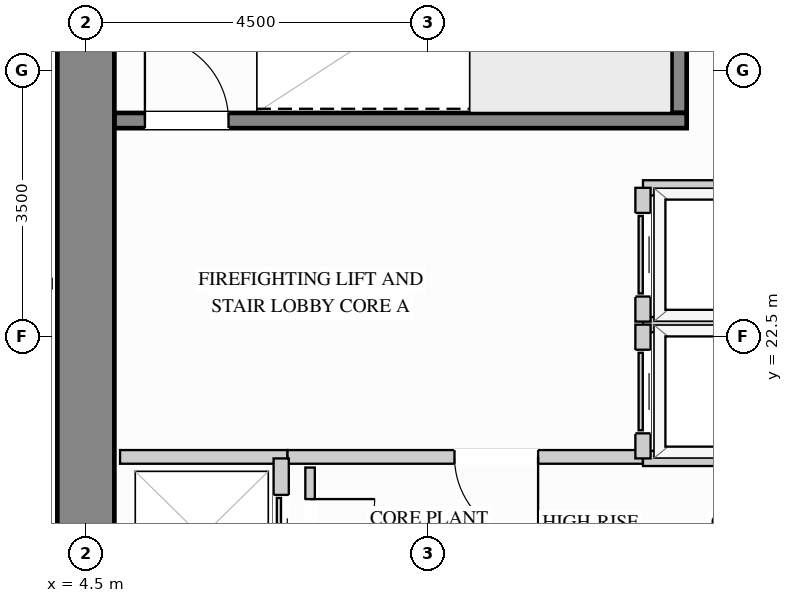
"""IFC4 building model, lengths in metres.
Left out: names, types, materials, properties, quantities, classifications, styles, units other than length and angle.
Written with IfcOpenShell. Run it as: python <this file> out.ifc"""

import sys

from ifc_helpers import new_model, si_unit, direction, frame, frame_2d, origin, place, context, subcontext, project, spatial, rectangle, extrude, source, transform, mapped, element, fill, save


model = new_model("IFC4")
c1 = context("Model", 3, precision=1e-05, world=origin(), true_north=direction((0.0, 1.0)))
c2 = subcontext(c1, "Body", "Model", "MODEL_VIEW")
j1 = project(units=[si_unit("LENGTHUNIT", "METRE"), si_unit("PLANEANGLEUNIT", "RADIAN")], contexts=[c1])
p1 = place(None, origin())
s1 = spatial("IfcSite", under=j1, at=p1, CompositionType="ELEMENT")
p2 = place(p1, origin())
s2 = spatial("IfcBuilding", under=s1, at=p2, CompositionType="ELEMENT")
p3 = place(p2, frame((0.0, 0.0, 99.0)))
s3 = spatial("IfcBuildingStorey", under=s2, at=p3, CompositionType="ELEMENT", Elevation=99.0)
m1 = source(origin(), c2, "Body", "SweptSolid", [
    extrude(rectangle(XDim=20.25, YDim=0.75, at=frame_2d((10.125, 0.0))), origin(), (0.0, 0.0, 1.0), 3.38),
])
p4 = place(p3, frame((4.5, 8.875, 0.0), z_axis=(0.0, 0.0, 1.0), x_axis=(0.0, 1.0, 0.0)))
e1 = element("IfcWall", 1, at=p4, inside=s3, PredefinedType="SHEAR", context=c2, shape_type="MappedRepresentation", body=[
    mapped(m1, transform((0.0, 0.0, 0.0), x_axis=(1.0, 0.0, 0.0), y_axis=(0.0, 1.0, 0.0), z_axis=(0.0, 0.0, 1.0))),
])
p5 = place(p3, frame((7.15, 20.92, 0.0), z_axis=(0.0, 0.0, 1.0), x_axis=(1.0, 0.0, 0.0)))
e2 = element("IfcWall", 2, at=p5, inside=s3, PredefinedType="PARTITIONING", context=c2, shape_type="SweptSolid", body=[
    extrude(rectangle(XDim=4.68, YDim=0.18, at=frame_2d((2.34, 0.0))), origin(), (0.0, 0.0, 1.0), 3.365),
])
p6 = place(p5, frame((2.2, 0.0, 0.0)))
e3 = element("IfcOpeningElement", 3, at=p6, cuts=e2, PredefinedType="OPENING", context=c2, shape_type="SweptSolid", body=[
    extrude(rectangle(XDim=1.1, YDim=2.15, at=frame_2d((0.55, 1.075))), frame((0.0, 0.1, 0.0), z_axis=(0.0, -1.0, 0.0), x_axis=(1.0, 0.0, 0.0)), (0.0, 0.0, 1.0), 0.2),
])
m2 = source(origin(), c2, "Body", "SweptSolid", [
    extrude(rectangle(XDim=2.2, YDim=0.18, at=frame_2d((1.1, 0.0))), origin(), (0.0, 0.0, 1.0), 3.365),
])
p7 = place(p3, frame((4.95, 20.92, 0.0), z_axis=(0.0, 0.0, 1.0), x_axis=(1.0, 0.0, 0.0)))
e4 = element("IfcWall", 4, at=p7, inside=s3, PredefinedType="PARTITIONING", context=c2, shape_type="MappedRepresentation", body=[
    mapped(m2, transform((0.0, 0.0, 0.0), x_axis=(1.0, 0.0, 0.0), y_axis=(0.0, 1.0, 0.0), z_axis=(0.0, 0.0, 1.0))),
])
p8 = place(p3, frame((7.45, 19.2, 0.0), z_axis=(0.0, 0.0, 1.0), x_axis=(0.0, 1.0, 0.0)))
e5 = element("IfcWall", 5, at=p8, inside=s3, PredefinedType="PARTITIONING", context=c2, shape_type="SweptSolid", body=[
    extrude(rectangle(XDim=1.58, YDim=0.125, at=frame_2d((0.79, 0.0))), origin(), (0.0, 0.0, 1.0), 3.365),
])
p9 = place(p8, frame((0.315, 0.0, 0.0)))
e6 = element("IfcOpeningElement", 6, at=p9, cuts=e5, PredefinedType="OPENING", context=c2, shape_type="SweptSolid", body=[
    extrude(rectangle(XDim=0.85, YDim=2.1, at=frame_2d((0.425, 1.05))), frame((0.0, 0.073, 0.0), z_axis=(0.0, -1.0, 0.0), x_axis=(1.0, 0.0, 0.0)), (0.0, 0.0, 1.0), 0.145),
])
m3 = source(origin(), c2, "Body", "SweptSolid", [
    extrude(rectangle(XDim=3.698, YDim=0.125, at=frame_2d((1.849, 0.0))), origin(), (0.0, 0.0, 1.0), 3.365),
])
p10 = place(p3, frame((0.352, 23.2, 0.0), z_axis=(0.0, 0.0, 1.0), x_axis=(1.0, 0.0, 0.0)))
e7 = element("IfcWall", 7, at=p10, inside=s3, PredefinedType="PARTITIONING", context=c2, shape_type="MappedRepresentation", body=[
    mapped(m3, transform((0.0, 0.0, 0.0), x_axis=(1.0, 0.0, 0.0), y_axis=(0.0, 1.0, 0.0), z_axis=(0.0, 0.0, 1.0))),
])
m4 = source(origin(), c2, "Body", "SweptSolid", [
    extrude(rectangle(XDim=2.265, YDim=0.2, at=frame_2d((1.132, 0.0))), origin(), (0.0, 0.0, 1.0), 3.365),
])
for number, where, z_axis, x_axis in (
    (8, (11.83, 22.66, 0.0), (0.0, 0.0, 1.0), (1.0, 0.0, 0.0)),
    (9, (11.83, 20.9, 0.0), (0.0, 0.0, 1.0), (1.0, 0.0, 0.0)),
):
    element("IfcWall", number, at=place(p3, frame(where, z_axis=z_axis, x_axis=x_axis)), inside=s3, PredefinedType="PARTITIONING", context=c2, shape_type="MappedRepresentation", body=[
        mapped(m4, transform((0.0, 0.0, 0.0), x_axis=(1.0, 0.0, 0.0), y_axis=(0.0, 1.0, 0.0), z_axis=(0.0, 0.0, 1.0))),
    ])
p11 = place(p3, frame((11.83, 20.9, 0.0), z_axis=(0.0, 0.0, 1.0), x_axis=(0.0, 1.0, 0.0)))
e10 = element("IfcWall", 10, at=p11, inside=s3, PredefinedType="PARTITIONING", context=c2, shape_type="SweptSolid", body=[
    extrude(rectangle(XDim=1.76, YDim=0.2, at=frame_2d((0.88, 0.0))), origin(), (0.0, 0.0, 1.0), 3.365),
])
p12 = place(p11, frame((0.33, 0.0, 0.0)))
e11 = element("IfcOpeningElement", 11, at=p12, cuts=e10, PredefinedType="OPENING", context=c2, shape_type="SweptSolid", body=[
    extrude(rectangle(XDim=1.1, YDim=2.2, at=frame_2d((0.55, 1.1))), frame((0.0, 0.11, 0.0), z_axis=(0.0, -1.0, 0.0), x_axis=(1.0, 0.0, 0.0)), (0.0, 0.0, 1.0), 0.22),
])
p13 = place(p3, frame((11.83, 24.46, 0.0), z_axis=(0.0, 0.0, 1.0), x_axis=(1.0, 0.0, 0.0)))
e12 = element("IfcWall", 12, at=p13, inside=s3, PredefinedType="PARTITIONING", context=c2, shape_type="MappedRepresentation", body=[
    mapped(m4, transform((0.0, 0.0, 0.0), x_axis=(1.0, 0.0, 0.0), y_axis=(0.0, 1.0, 0.0), z_axis=(0.0, 0.0, 1.0))),
])
p14 = place(p3, frame((11.83, 22.7, 0.0), z_axis=(0.0, 0.0, 1.0), x_axis=(0.0, 1.0, 0.0)))
e13 = element("IfcWall", 13, at=p14, inside=s3, PredefinedType="PARTITIONING", context=c2, shape_type="SweptSolid", body=[
    extrude(rectangle(XDim=1.76, YDim=0.2, at=frame_2d((0.88, 0.0))), origin(), (0.0, 0.0, 1.0), 3.365),
])
p15 = place(p14, frame((0.33, 0.0, 0.0)))
e14 = element("IfcOpeningElement", 14, at=p15, cuts=e13, PredefinedType="OPENING", context=c2, shape_type="SweptSolid", body=[
    extrude(rectangle(XDim=1.1, YDim=2.2, at=frame_2d((0.55, 1.1))), frame((0.0, 0.11, 0.0), z_axis=(0.0, -1.0, 0.0), x_axis=(1.0, 0.0, 0.0)), (0.0, 0.0, 1.0), 0.22),
])
p16 = place(p3, frame((7.07, 18.84, 0.0), z_axis=(0.0, 0.0, 1.0), x_axis=(0.0, 1.0, 0.0)))
e15 = element("IfcWall", 15, at=p16, inside=s3, PredefinedType="PARTITIONING", context=c2, shape_type="SweptSolid", body=[
    extrude(rectangle(XDim=2.06, YDim=0.2, at=frame_2d((1.03, 0.0))), origin(), (0.0, 0.0, 1.0), 3.365),
])
p17 = place(p16, frame((0.48, 0.0, 0.0)))
e16 = element("IfcOpeningElement", 16, at=p17, cuts=e15, PredefinedType="OPENING", context=c2, shape_type="SweptSolid", body=[
    extrude(rectangle(XDim=1.1, YDim=2.2, at=frame_2d((0.55, 1.1))), frame((0.0, 0.11, 0.0), z_axis=(0.0, -1.0, 0.0), x_axis=(1.0, 0.0, 0.0)), (0.0, 0.0, 1.0), 0.22),
])
m5 = source(origin(), c2, "Body", "SweptSolid", [
    extrude(rectangle(XDim=3.678, YDim=0.2, at=frame_2d((1.839, 0.0))), origin(), (0.0, 0.0, 1.0), 3.38),
])
p18 = place(p3, frame((12.305, 25.445, 0.0), z_axis=(0.0, 0.0, 1.0), x_axis=(0.0, 1.0, 0.0)))
e17 = element("IfcWall", 17, at=p18, inside=s3, PredefinedType="SHEAR", context=c2, shape_type="MappedRepresentation", body=[
    mapped(m5, transform((0.0, 0.0, 0.0), x_axis=(1.0, 0.0, 0.0), y_axis=(0.0, 1.0, 0.0), z_axis=(0.0, 0.0, 1.0))),
])
p19 = place(p3, frame((4.877, 25.345, 0.0), z_axis=(0.0, 0.0, 1.0), x_axis=(1.0, 0.0, 0.0)))
e18 = element("IfcWall", 18, at=p19, inside=s3, PredefinedType="SHEAR", context=c2, shape_type="SweptSolid", body=[
    extrude(rectangle(XDim=7.528, YDim=0.2, at=frame_2d((3.764, 0.0))), origin(), (0.0, 0.0, 1.0), 3.38),
])
p20 = place(p19, frame((0.4, 0.0, 0.0)))
e19 = element("IfcOpeningElement", 19, at=p20, cuts=e18, PredefinedType="OPENING", context=c2, shape_type="SweptSolid", body=[
    extrude(rectangle(XDim=1.1, YDim=2.15, at=frame_2d((0.55, 1.075))), frame((0.0, 0.11, 0.0), z_axis=(0.0, -1.0, 0.0), x_axis=(1.0, 0.0, 0.0)), (0.0, 0.0, 1.0), 0.22),
])
m6 = source(origin(), c2, "Body", "SweptSolid", [
    extrude(rectangle(XDim=1.1, YDim=2.15, at=frame_2d((0.55, 1.075))), frame((0.0, 0.025, 0.0), z_axis=(0.0, -1.0, 0.0), x_axis=(1.0, 0.0, 0.0)), (0.0, 0.0, 1.0), 0.05),
])
p21 = place(p6, origin())
e20 = element("IfcDoor", 20, at=p21, inside=s3, OperationType="SINGLE_SWING_RIGHT", PredefinedType="DOOR", context=c2, shape_type="MappedRepresentation", body=[
    mapped(m6, transform((0.0, 0.0, 0.0), x_axis=(1.0, 0.0, 0.0), y_axis=(0.0, 1.0, 0.0), z_axis=(0.0, 0.0, 1.0))),
])
fill(e3, e20)
m7 = source(origin(), c2, "Body", "SweptSolid", [
    extrude(rectangle(XDim=1.1, YDim=2.2, at=frame_2d((0.55, 1.1))), frame((0.0, 0.025, 0.0), z_axis=(0.0, -1.0, 0.0), x_axis=(1.0, 0.0, 0.0)), (0.0, 0.0, 1.0), 0.05),
])
p22 = place(p12, origin())
e21 = element("IfcDoor", 21, at=p22, inside=s3, OperationType="SLIDING_TO_LEFT", PredefinedType="DOOR", context=c2, shape_type="MappedRepresentation", body=[
    mapped(m7, transform((0.0, 0.0, 0.0), x_axis=(1.0, 0.0, 0.0), y_axis=(0.0, 1.0, 0.0), z_axis=(0.0, 0.0, 1.0))),
])
fill(e11, e21)
p23 = place(p15, origin())
e22 = element("IfcDoor", 22, at=p23, inside=s3, OperationType="SLIDING_TO_LEFT", PredefinedType="DOOR", context=c2, shape_type="MappedRepresentation", body=[
    mapped(m7, transform((0.0, 0.0, 0.0), x_axis=(1.0, 0.0, 0.0), y_axis=(0.0, 1.0, 0.0), z_axis=(0.0, 0.0, 1.0))),
])
fill(e14, e22)
p24 = place(p17, origin())
e23 = element("IfcDoor", 23, at=p24, inside=s3, OperationType="SLIDING_TO_LEFT", PredefinedType="DOOR", context=c2, shape_type="MappedRepresentation", body=[
    mapped(m7, transform((0.0, 0.0, 0.0), x_axis=(1.0, 0.0, 0.0), y_axis=(0.0, 1.0, 0.0), z_axis=(0.0, 0.0, 1.0))),
])
fill(e16, e23)
m8 = source(origin(), c2, "Body", "SweptSolid", [
    extrude(rectangle(XDim=0.85, YDim=2.1, at=frame_2d((0.425, 1.05))), frame((0.0, 0.025, 0.0), z_axis=(0.0, -1.0, 0.0), x_axis=(1.0, 0.0, 0.0)), (0.0, 0.0, 1.0), 0.05),
])
p25 = place(p9, origin())
e24 = element("IfcDoor", 24, at=p25, inside=s3, OperationType="SINGLE_SWING_RIGHT", PredefinedType="DOOR", context=c2, shape_type="MappedRepresentation", body=[
    mapped(m8, transform((0.0, 0.0, 0.0), x_axis=(1.0, 0.0, 0.0), y_axis=(0.0, 1.0, 0.0), z_axis=(0.0, 0.0, 1.0))),
])
fill(e6, e24)
m9 = source(origin(), c2, "Body", "SweptSolid", [
    extrude(rectangle(XDim=1.1, YDim=2.15, at=frame_2d((0.55, 1.075))), frame((0.0, 0.025, 0.0), z_axis=(0.0, -1.0, 0.0), x_axis=(1.0, 0.0, 0.0)), (0.0, 0.0, 1.0), 0.05),
])
p26 = place(p20, origin())
e25 = element("IfcDoor", 25, at=p26, inside=s3, OperationType="SINGLE_SWING_LEFT", PredefinedType="DOOR", context=c2, shape_type="MappedRepresentation", body=[
    mapped(m9, transform((0.0, 0.0, 0.0), x_axis=(1.0, 0.0, 0.0), y_axis=(0.0, 1.0, 0.0), z_axis=(0.0, 0.0, 1.0))),
])
fill(e19, e25)
save(model, sys.argv[1])
